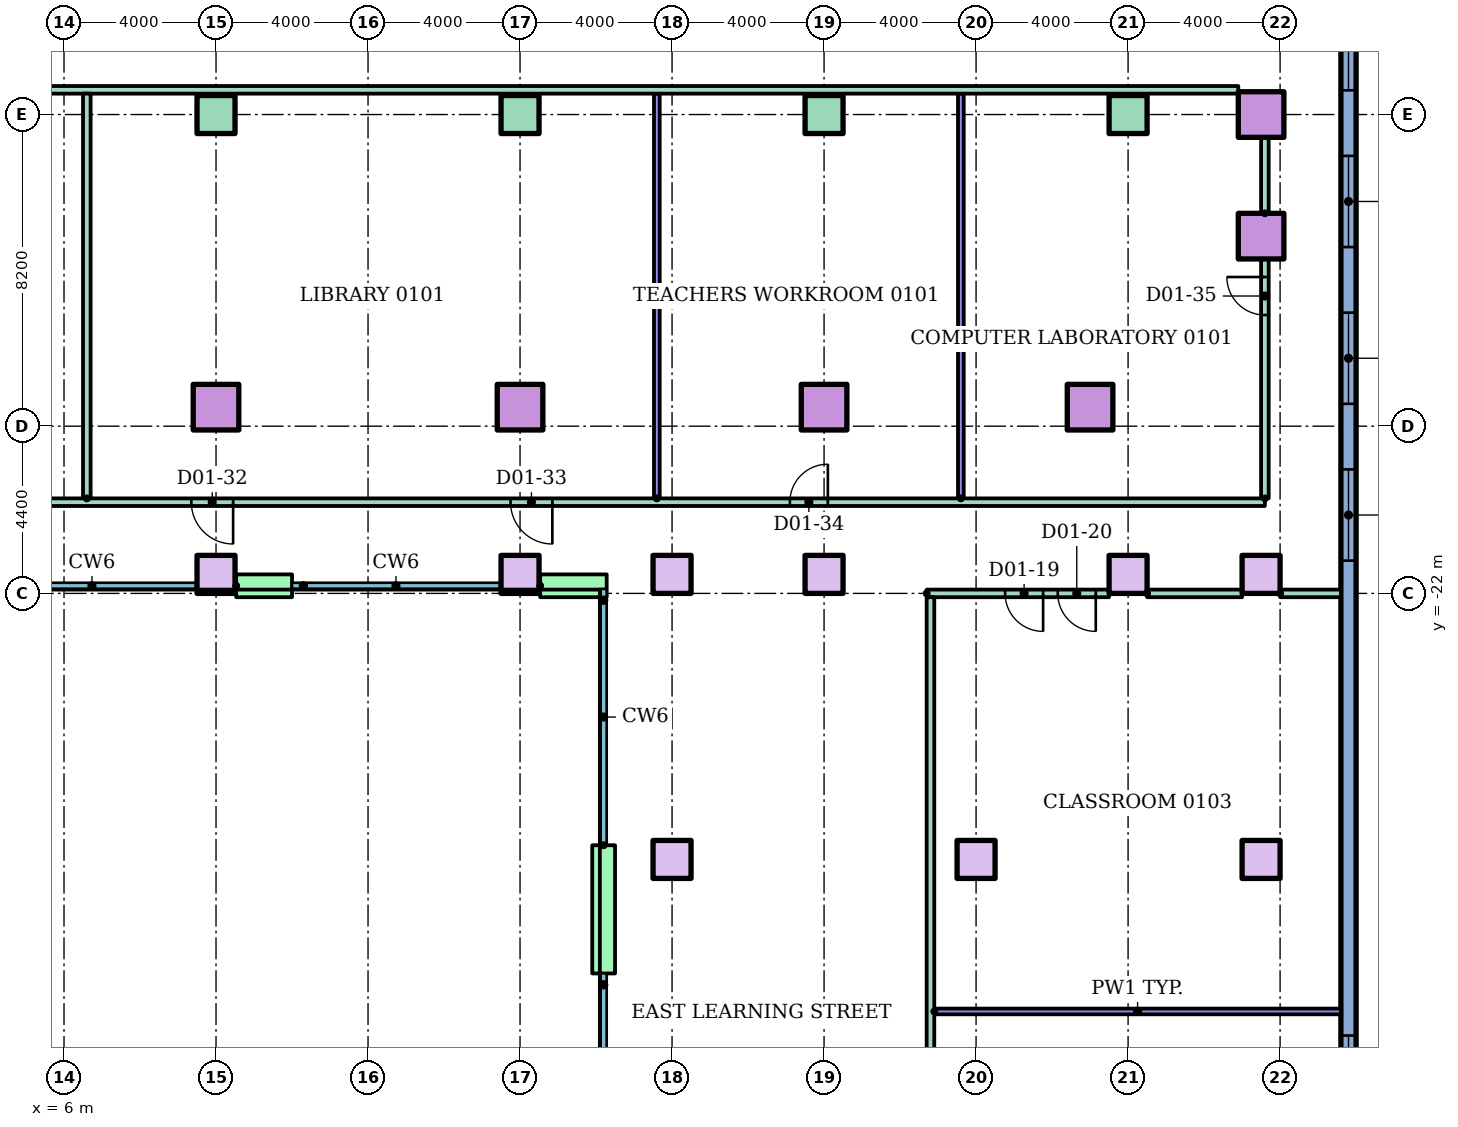
"""IFC4 building model, lengths in metres.
Left out: names, types, materials, properties, quantities, classifications, styles, units other than length and angle.
Written with IfcOpenShell. Run it as: python <this file> out.ifc"""

import sys

from ifc_helpers import new_model, si_unit, direction, frame, frame_2d, origin, origin_2d, place, context, subcontext, project, spatial, rectangle, hollow_rectangle, extrude, element, fill, save


model = new_model("IFC4")
c1 = context("Model", 3, precision=1e-05, world=origin(), true_north=direction((0.0, 1.0)))
c2 = subcontext(c1, "Body", "Model", "MODEL_VIEW")
j1 = project(units=[si_unit("LENGTHUNIT", "METRE"), si_unit("PLANEANGLEUNIT", "RADIAN")], contexts=[c1])
p1 = place(None, origin())
s1 = spatial("IfcSite", under=j1, at=p1, CompositionType="ELEMENT")
p2 = place(p1, origin())
s2 = spatial("IfcBuilding", under=s1, at=p2, CompositionType="ELEMENT")
p3 = place(p2, frame((0.0, 0.0, 6.0)))
s3 = spatial("IfcBuildingStorey", under=s2, at=p3, CompositionType="ELEMENT", Elevation=6.0)
for number, where in (
    (1, (10.0, -17.1, 0.0)),
    (2, (18.0, -17.1, 0.0)),
    (3, (26.0, -17.1, 0.0)),
    (4, (33.0, -17.1, 0.0)),
    (5, (37.5, -12.6, 0.0)),
):
    element("IfcColumn", number, at=place(p3, frame(where)), inside=s3, PredefinedType="COLUMN", context=c2, shape_type="SweptSolid", body=[
        extrude(hollow_rectangle(XDim=1.2, YDim=1.2, WallThickness=0.06, at=origin_2d()), origin(), (0.0, 0.0, 1.0), 4.0),
    ])
for number, where in (
    (6, (10.0, -9.4, 0.0)),
    (7, (18.0, -9.4, 0.0)),
    (8, (26.0, -9.4, 0.0)),
    (9, (34.0, -9.4, 0.0)),
):
    element("IfcColumn", number, at=place(p3, frame(where)), inside=s3, PredefinedType="COLUMN", context=c2, shape_type="SweptSolid", body=[
        extrude(rectangle(XDim=1.0, YDim=1.0, at=origin_2d()), origin(), (0.0, 0.0, 1.0), 4.0),
    ])
p4 = place(p3, frame((37.5, -9.4, 0.0)))
e10 = element("IfcColumn", 10, at=p4, inside=s3, PredefinedType="COLUMN", context=c2, shape_type="SweptSolid", body=[
    extrude(hollow_rectangle(XDim=1.2, YDim=1.2, WallThickness=0.06, at=origin_2d()), origin(), (0.0, 0.0, 1.0), 4.0),
])
for number, where in (
    (11, (22.0, -29.0, 0.0)),
    (12, (30.0, -29.0, 0.0)),
    (13, (37.5, -29.0, 0.0)),
    (14, (10.0, -21.5, 0.0)),
    (15, (18.0, -21.5, 0.0)),
    (16, (22.0, -21.5, 0.0)),
    (17, (26.0, -21.5, 0.0)),
    (18, (34.0, -21.5, 0.0)),
    (19, (37.5, -21.5, 0.0)),
):
    element("IfcColumn", number, at=place(p3, frame(where)), inside=s3, PredefinedType="COLUMN", context=c2, shape_type="SweptSolid", body=[
        extrude(rectangle(XDim=1.0, YDim=1.0, at=origin_2d()), origin(), (0.0, 0.0, 1.0), 4.0),
    ])
p5 = place(p3, frame((39.8, -50.0, 0.0), z_axis=(0.0, 0.0, 1.0), x_axis=(0.0, 1.0, 0.0)))
e20 = element("IfcWall", 20, at=p5, inside=s3, PredefinedType="STANDARD", context=c2, shape_type="SweptSolid", body=[
    extrude(rectangle(XDim=70.0, YDim=0.4, at=frame_2d((35.0, 0.0))), origin(), (0.0, 0.0, 1.0), 3.7),
])
p6 = place(p5, frame((0.75, 0.0, 0.9)))
e21 = element("IfcOpeningElement", 21, at=p6, cuts=e20, PredefinedType="OPENING", context=c2, shape_type="SweptSolid", body=[
    extrude(rectangle(XDim=2.4, YDim=2.1, at=frame_2d((1.2, 1.05))), frame((0.0, 0.21, 0.0), z_axis=(0.0, -1.0, 0.0), x_axis=(1.0, 0.0, 0.0)), (0.0, 0.0, 1.0), 0.42),
])
p7 = place(p5, frame((6.633, 0.0, 0.9)))
e22 = element("IfcOpeningElement", 22, at=p7, cuts=e20, PredefinedType="OPENING", context=c2, shape_type="SweptSolid", body=[
    extrude(rectangle(XDim=2.4, YDim=2.1, at=frame_2d((1.2, 1.05))), frame((0.0, 0.21, 0.0), z_axis=(0.0, -1.0, 0.0), x_axis=(1.0, 0.0, 0.0)), (0.0, 0.0, 1.0), 0.42),
])
p8 = place(p5, frame((10.3, 0.0, 0.9)))
e23 = element("IfcOpeningElement", 23, at=p8, cuts=e20, PredefinedType="OPENING", context=c2, shape_type="SweptSolid", body=[
    extrude(rectangle(XDim=2.4, YDim=2.1, at=frame_2d((1.2, 1.05))), frame((0.0, 0.21, 0.0), z_axis=(0.0, -1.0, 0.0), x_axis=(1.0, 0.0, 0.0)), (0.0, 0.0, 1.0), 0.42),
])
p9 = place(p5, frame((13.967, 0.0, 0.9)))
e24 = element("IfcOpeningElement", 24, at=p9, cuts=e20, PredefinedType="OPENING", context=c2, shape_type="SweptSolid", body=[
    extrude(rectangle(XDim=2.4, YDim=2.1, at=frame_2d((1.2, 1.05))), frame((0.0, 0.21, 0.0), z_axis=(0.0, -1.0, 0.0), x_axis=(1.0, 0.0, 0.0)), (0.0, 0.0, 1.0), 0.42),
])
p10 = place(p5, frame((28.863, 0.0, 0.9)))
e25 = element("IfcOpeningElement", 25, at=p10, cuts=e20, PredefinedType="OPENING", context=c2, shape_type="SweptSolid", body=[
    extrude(rectangle(XDim=2.4, YDim=2.1, at=frame_2d((1.2, 1.05))), frame((0.0, 0.21, 0.0), z_axis=(0.0, -1.0, 0.0), x_axis=(1.0, 0.0, 0.0)), (0.0, 0.0, 1.0), 0.42),
])
p11 = place(p5, frame((32.988, 0.0, 0.9)))
e26 = element("IfcOpeningElement", 26, at=p11, cuts=e20, PredefinedType="OPENING", context=c2, shape_type="SweptSolid", body=[
    extrude(rectangle(XDim=2.4, YDim=2.1, at=frame_2d((1.2, 1.05))), frame((0.0, 0.21, 0.0), z_axis=(0.0, -1.0, 0.0), x_axis=(1.0, 0.0, 0.0)), (0.0, 0.0, 1.0), 0.42),
])
p12 = place(p5, frame((37.113, 0.0, 0.9)))
e27 = element("IfcOpeningElement", 27, at=p12, cuts=e20, PredefinedType="OPENING", context=c2, shape_type="SweptSolid", body=[
    extrude(rectangle(XDim=2.4, YDim=2.1, at=frame_2d((1.2, 1.05))), frame((0.0, 0.21, 0.0), z_axis=(0.0, -1.0, 0.0), x_axis=(1.0, 0.0, 0.0)), (0.0, 0.0, 1.0), 0.42),
])
p13 = place(p5, frame((41.238, 0.0, 0.9)))
e28 = element("IfcOpeningElement", 28, at=p13, cuts=e20, PredefinedType="OPENING", context=c2, shape_type="SweptSolid", body=[
    extrude(rectangle(XDim=2.4, YDim=2.1, at=frame_2d((1.2, 1.05))), frame((0.0, 0.21, 0.0), z_axis=(0.0, -1.0, 0.0), x_axis=(1.0, 0.0, 0.0)), (0.0, 0.0, 1.0), 0.42),
])
p14 = place(p5, frame((45.363, 0.0, 0.9)))
e29 = element("IfcOpeningElement", 29, at=p14, cuts=e20, PredefinedType="OPENING", context=c2, shape_type="SweptSolid", body=[
    extrude(rectangle(XDim=2.4, YDim=2.1, at=frame_2d((1.2, 1.05))), frame((0.0, 0.21, 0.0), z_axis=(0.0, -1.0, 0.0), x_axis=(1.0, 0.0, 0.0)), (0.0, 0.0, 1.0), 0.42),
])
p15 = place(p5, frame((49.488, 0.0, 0.9)))
e30 = element("IfcOpeningElement", 30, at=p15, cuts=e20, PredefinedType="OPENING", context=c2, shape_type="SweptSolid", body=[
    extrude(rectangle(XDim=2.4, YDim=2.1, at=frame_2d((1.2, 1.05))), frame((0.0, 0.21, 0.0), z_axis=(0.0, -1.0, 0.0), x_axis=(1.0, 0.0, 0.0)), (0.0, 0.0, 1.0), 0.42),
])
p16 = place(p5, frame((53.613, 0.0, 0.9)))
e31 = element("IfcOpeningElement", 31, at=p16, cuts=e20, PredefinedType="OPENING", context=c2, shape_type="SweptSolid", body=[
    extrude(rectangle(XDim=2.4, YDim=2.1, at=frame_2d((1.2, 1.05))), frame((0.0, 0.21, 0.0), z_axis=(0.0, -1.0, 0.0), x_axis=(1.0, 0.0, 0.0)), (0.0, 0.0, 1.0), 0.42),
])
p17 = place(p5, frame((57.738, 0.0, 0.9)))
e32 = element("IfcOpeningElement", 32, at=p17, cuts=e20, PredefinedType="OPENING", context=c2, shape_type="SweptSolid", body=[
    extrude(rectangle(XDim=2.4, YDim=2.1, at=frame_2d((1.2, 1.05))), frame((0.0, 0.21, 0.0), z_axis=(0.0, -1.0, 0.0), x_axis=(1.0, 0.0, 0.0)), (0.0, 0.0, 1.0), 0.42),
])
p18 = place(p5, frame((62.05, 0.0, 0.9)))
e33 = element("IfcOpeningElement", 33, at=p18, cuts=e20, PredefinedType="OPENING", context=c2, shape_type="SweptSolid", body=[
    extrude(rectangle(XDim=2.4, YDim=2.1, at=frame_2d((1.2, 1.05))), frame((0.0, 0.21, 0.0), z_axis=(0.0, -1.0, 0.0), x_axis=(1.0, 0.0, 0.0)), (0.0, 0.0, 1.0), 0.42),
])
p19 = place(p5, frame((66.55, 0.0, 0.9)))
e34 = element("IfcOpeningElement", 34, at=p19, cuts=e20, PredefinedType="OPENING", context=c2, shape_type="SweptSolid", body=[
    extrude(rectangle(XDim=2.4, YDim=2.1, at=frame_2d((1.2, 1.05))), frame((0.0, 0.21, 0.0), z_axis=(0.0, -1.0, 0.0), x_axis=(1.0, 0.0, 0.0)), (0.0, 0.0, 1.0), 0.42),
])
p20 = place(p3, frame((10.53, -21.8, 0.0)))
e35 = element("IfcWall", 35, at=p20, inside=s3, PredefinedType="STANDARD", context=c2, shape_type="SweptSolid", body=[
    extrude(rectangle(XDim=1.47, YDim=0.6, at=frame_2d((0.735, 0.0))), origin(), (0.0, 0.0, 1.0), 3.7),
])
p21 = place(p3, frame((18.53, -21.8, 0.0)))
e36 = element("IfcWall", 36, at=p21, inside=s3, PredefinedType="STANDARD", context=c2, shape_type="SweptSolid", body=[
    extrude(rectangle(XDim=1.75, YDim=0.6, at=frame_2d((0.875, 0.0))), origin(), (0.0, 0.0, 1.0), 3.7),
])
p22 = place(p3, frame((20.2, -28.627, 0.0), z_axis=(0.0, 0.0, 1.0), x_axis=(0.0, -1.0, 0.0)))
e37 = element("IfcWall", 37, at=p22, inside=s3, PredefinedType="STANDARD", context=c2, shape_type="SweptSolid", body=[
    extrude(rectangle(XDim=3.373, YDim=0.6, at=frame_2d((1.687, 0.0))), origin(), (0.0, 0.0, 1.0), 3.7),
])
p23 = place(p3, frame((28.9, -33.0, 0.0)))
e38 = element("IfcWall", 38, at=p23, inside=s3, PredefinedType="PARTITIONING", context=c2, shape_type="SweptSolid", body=[
    extrude(rectangle(XDim=10.7, YDim=0.15, at=frame_2d((5.35, 0.0))), origin(), (0.0, 0.0, 1.0), 3.7),
])
p24 = place(p3, frame((28.7, -22.0, 0.0)))
e39 = element("IfcWall", 39, at=p24, inside=s3, PredefinedType="PARTITIONING", context=c2, shape_type="SweptSolid", body=[
    extrude(rectangle(XDim=4.8, YDim=0.2, at=frame_2d((2.4, 0.0))), origin(), (0.0, 0.0, 1.0), 3.7),
])
p25 = place(p24, frame((2.064, 0.0, 0.0)))
e40 = element("IfcOpeningElement", 40, at=p25, cuts=e39, PredefinedType="OPENING", context=c2, shape_type="SweptSolid", body=[
    extrude(rectangle(XDim=1.0, YDim=2.1, at=frame_2d((0.5, 1.05))), frame((0.0, 0.11, 0.0), z_axis=(0.0, -1.0, 0.0), x_axis=(1.0, 0.0, 0.0)), (0.0, 0.0, 1.0), 0.22),
])
p26 = place(p24, frame((3.45, 0.0, 0.0)))
e41 = element("IfcOpeningElement", 41, at=p26, cuts=e39, PredefinedType="OPENING", context=c2, shape_type="SweptSolid", body=[
    extrude(rectangle(XDim=1.0, YDim=2.1, at=frame_2d((0.5, 1.05))), frame((0.0, 0.11, 0.0), z_axis=(0.0, -1.0, 0.0), x_axis=(1.0, 0.0, 0.0)), (0.0, 0.0, 1.0), 0.22),
])
p27 = place(p3, frame((34.5, -22.0, 0.0)))
e42 = element("IfcWall", 42, at=p27, inside=s3, PredefinedType="PARTITIONING", context=c2, shape_type="SweptSolid", body=[
    extrude(rectangle(XDim=2.5, YDim=0.2, at=frame_2d((1.25, 0.0))), origin(), (0.0, 0.0, 1.0), 3.7),
])
p28 = place(p3, frame((38.0, -22.0, 0.0)))
e43 = element("IfcWall", 43, at=p28, inside=s3, PredefinedType="PARTITIONING", context=c2, shape_type="SweptSolid", body=[
    extrude(rectangle(XDim=1.6, YDim=0.2, at=frame_2d((0.8, 0.0))), origin(), (0.0, 0.0, 1.0), 3.7),
])
p29 = place(p3, frame((-37.6, -19.6, 0.0)))
e44 = element("IfcWall", 44, at=p29, inside=s3, PredefinedType="PARTITIONING", context=c2, shape_type="SweptSolid", body=[
    extrude(rectangle(XDim=75.2, YDim=0.2, at=frame_2d((37.6, 0.0))), origin(), (0.0, 0.0, 1.0), 3.7),
])
p30 = place(p29, frame((14.5, 0.0, 0.0)))
e45 = element("IfcOpeningElement", 45, at=p30, cuts=e44, PredefinedType="OPENING", context=c2, shape_type="SweptSolid", body=[
    extrude(rectangle(XDim=1.0, YDim=2.1, at=frame_2d((0.5, 1.05))), frame((0.0, 0.11, 0.0), z_axis=(0.0, -1.0, 0.0), x_axis=(1.0, 0.0, 0.0)), (0.0, 0.0, 1.0), 0.22),
])
p31 = place(p29, frame((22.184, 0.0, 0.0)))
e46 = element("IfcOpeningElement", 46, at=p31, cuts=e44, PredefinedType="OPENING", context=c2, shape_type="SweptSolid", body=[
    extrude(rectangle(XDim=1.0, YDim=2.1, at=frame_2d((0.5, 1.05))), frame((0.0, 0.11, 0.0), z_axis=(0.0, -1.0, 0.0), x_axis=(1.0, 0.0, 0.0)), (0.0, 0.0, 1.0), 0.22),
])
p32 = place(p29, frame((29.016, 0.0, 0.0)))
e47 = element("IfcOpeningElement", 47, at=p32, cuts=e44, PredefinedType="OPENING", context=c2, shape_type="SweptSolid", body=[
    extrude(rectangle(XDim=1.0, YDim=2.1, at=frame_2d((0.5, 1.05))), frame((0.0, 0.11, 0.0), z_axis=(0.0, -1.0, 0.0), x_axis=(1.0, 0.0, 0.0)), (0.0, 0.0, 1.0), 0.22),
])
p33 = place(p29, frame((34.34, 0.0, 0.0)))
e48 = element("IfcOpeningElement", 48, at=p33, cuts=e44, PredefinedType="OPENING", context=c2, shape_type="SweptSolid", body=[
    extrude(rectangle(XDim=1.0, YDim=2.1, at=frame_2d((0.5, 1.05))), frame((0.0, 0.11, 0.0), z_axis=(0.0, -1.0, 0.0), x_axis=(1.0, 0.0, 0.0)), (0.0, 0.0, 1.0), 0.22),
])
p34 = place(p29, frame((41.06, 0.0, 0.0)))
e49 = element("IfcOpeningElement", 49, at=p34, cuts=e44, PredefinedType="OPENING", context=c2, shape_type="SweptSolid", body=[
    extrude(rectangle(XDim=1.0, YDim=2.1, at=frame_2d((0.5, 1.05))), frame((0.0, 0.11, 0.0), z_axis=(0.0, -1.0, 0.0), x_axis=(1.0, 0.0, 0.0)), (0.0, 0.0, 1.0), 0.22),
])
p35 = place(p29, frame((46.95, 0.0, 0.0)))
e50 = element("IfcOpeningElement", 50, at=p35, cuts=e44, PredefinedType="OPENING", context=c2, shape_type="SweptSolid", body=[
    extrude(rectangle(XDim=1.1, YDim=2.1, at=frame_2d((0.55, 1.05))), frame((0.0, 0.11, 0.0), z_axis=(0.0, -1.0, 0.0), x_axis=(1.0, 0.0, 0.0)), (0.0, 0.0, 1.0), 0.22),
])
p36 = place(p29, frame((55.35, 0.0, 0.0)))
e51 = element("IfcOpeningElement", 51, at=p36, cuts=e44, PredefinedType="OPENING", context=c2, shape_type="SweptSolid", body=[
    extrude(rectangle(XDim=1.1, YDim=2.1, at=frame_2d((0.55, 1.05))), frame((0.0, 0.11, 0.0), z_axis=(0.0, -1.0, 0.0), x_axis=(1.0, 0.0, 0.0)), (0.0, 0.0, 1.0), 0.22),
])
p37 = place(p29, frame((62.7, 0.0, 0.0)))
e52 = element("IfcOpeningElement", 52, at=p37, cuts=e44, PredefinedType="OPENING", context=c2, shape_type="SweptSolid", body=[
    extrude(rectangle(XDim=1.0, YDim=2.1, at=frame_2d((0.5, 1.05))), frame((0.0, 0.11, 0.0), z_axis=(0.0, -1.0, 0.0), x_axis=(1.0, 0.0, 0.0)), (0.0, 0.0, 1.0), 0.22),
])
p38 = place(p3, frame((-36.9, -8.75, 0.0)))
e53 = element("IfcWall", 53, at=p38, inside=s3, PredefinedType="PARTITIONING", context=c2, shape_type="SweptSolid", body=[
    extrude(rectangle(XDim=73.8, YDim=0.2, at=frame_2d((36.9, 0.0))), origin(), (0.0, 0.0, 1.0), 3.7),
])
p39 = place(p3, frame((6.6, -19.5, 0.0), z_axis=(0.0, 0.0, 1.0), x_axis=(0.0, 1.0, 0.0)))
e54 = element("IfcWall", 54, at=p39, inside=s3, PredefinedType="PARTITIONING", context=c2, shape_type="SweptSolid", body=[
    extrude(rectangle(XDim=10.65, YDim=0.2, at=frame_2d((5.325, 0.0))), origin(), (0.0, 0.0, 1.0), 3.7),
])
p40 = place(p3, frame((21.6, -19.5, 0.0), z_axis=(0.0, 0.0, 1.0), x_axis=(0.0, 1.0, 0.0)))
e55 = element("IfcWall", 55, at=p40, inside=s3, PredefinedType="PARTITIONING", context=c2, shape_type="SweptSolid", body=[
    extrude(rectangle(XDim=10.65, YDim=0.15, at=frame_2d((5.325, 0.0))), origin(), (0.0, 0.0, 1.0), 3.7),
])
p41 = place(p3, frame((28.8, -44.0, 0.0), z_axis=(0.0, 0.0, 1.0), x_axis=(0.0, 1.0, 0.0)))
e56 = element("IfcWall", 56, at=p41, inside=s3, PredefinedType="PARTITIONING", context=c2, shape_type="SweptSolid", body=[
    extrude(rectangle(XDim=21.9, YDim=0.2, at=frame_2d((10.95, 0.0))), origin(), (0.0, 0.0, 1.0), 3.7),
])
p42 = place(p3, frame((29.6, -19.5, 0.0), z_axis=(0.0, 0.0, 1.0), x_axis=(0.0, 1.0, 0.0)))
e57 = element("IfcWall", 57, at=p42, inside=s3, PredefinedType="PARTITIONING", context=c2, shape_type="SweptSolid", body=[
    extrude(rectangle(XDim=10.65, YDim=0.15, at=frame_2d((5.325, 0.0))), origin(), (0.0, 0.0, 1.0), 3.7),
])
p43 = place(p3, frame((37.6, -19.5, 0.0), z_axis=(0.0, 0.0, 1.0), x_axis=(0.0, 1.0, 0.0)))
e58 = element("IfcWall", 58, at=p43, inside=s3, PredefinedType="PARTITIONING", context=c2, shape_type="SweptSolid", body=[
    extrude(rectangle(XDim=6.3, YDim=0.2, at=frame_2d((3.15, 0.0))), origin(), (0.0, 0.0, 1.0), 3.7),
])
p44 = place(p43, frame((4.825, 0.0, 0.0)))
e59 = element("IfcOpeningElement", 59, at=p44, cuts=e58, PredefinedType="OPENING", context=c2, shape_type="SweptSolid", body=[
    extrude(rectangle(XDim=1.0, YDim=2.1, at=frame_2d((0.5, 1.05))), frame((0.0, 0.11, 0.0), z_axis=(0.0, -1.0, 0.0), x_axis=(1.0, 0.0, 0.0)), (0.0, 0.0, 1.0), 0.22),
])
p45 = place(p3, frame((37.6, -12.0, 0.0), z_axis=(0.0, 0.0, 1.0), x_axis=(0.0, 1.0, 0.0)))
e60 = element("IfcWall", 60, at=p45, inside=s3, PredefinedType="PARTITIONING", context=c2, shape_type="SweptSolid", body=[
    extrude(rectangle(XDim=2.0, YDim=0.2, at=frame_2d((1.0, 0.0))), origin(), (0.0, 0.0, 1.0), 3.7),
])
p46 = place(p9, origin())
e61 = element("IfcWindow", 61, at=p46, inside=s3, PartitioningType="SINGLE_PANEL", PredefinedType="WINDOW", context=c2, shape_type="SweptSolid", body=[
    extrude(rectangle(XDim=2.4, YDim=2.1, at=frame_2d((1.2, 1.05))), frame((0.0, 0.03, 0.0), z_axis=(0.0, -1.0, 0.0), x_axis=(1.0, 0.0, 0.0)), (0.0, 0.0, 1.0), 0.06),
])
fill(e24, e61)
p47 = place(p10, origin())
e62 = element("IfcWindow", 62, at=p47, inside=s3, PartitioningType="SINGLE_PANEL", PredefinedType="WINDOW", context=c2, shape_type="SweptSolid", body=[
    extrude(rectangle(XDim=2.4, YDim=2.1, at=frame_2d((1.2, 1.05))), frame((0.0, 0.03, 0.0), z_axis=(0.0, -1.0, 0.0), x_axis=(1.0, 0.0, 0.0)), (0.0, 0.0, 1.0), 0.06),
])
fill(e25, e62)
p48 = place(p11, origin())
e63 = element("IfcWindow", 63, at=p48, inside=s3, PartitioningType="SINGLE_PANEL", PredefinedType="WINDOW", context=c2, shape_type="SweptSolid", body=[
    extrude(rectangle(XDim=2.4, YDim=2.1, at=frame_2d((1.2, 1.05))), frame((0.0, 0.03, 0.0), z_axis=(0.0, -1.0, 0.0), x_axis=(1.0, 0.0, 0.0)), (0.0, 0.0, 1.0), 0.06),
])
fill(e26, e63)
p49 = place(p12, origin())
e64 = element("IfcWindow", 64, at=p49, inside=s3, PartitioningType="SINGLE_PANEL", PredefinedType="WINDOW", context=c2, shape_type="SweptSolid", body=[
    extrude(rectangle(XDim=2.4, YDim=2.1, at=frame_2d((1.2, 1.05))), frame((0.0, 0.03, 0.0), z_axis=(0.0, -1.0, 0.0), x_axis=(1.0, 0.0, 0.0)), (0.0, 0.0, 1.0), 0.06),
])
fill(e27, e64)
p50 = place(p13, origin())
e65 = element("IfcWindow", 65, at=p50, inside=s3, PartitioningType="SINGLE_PANEL", PredefinedType="WINDOW", context=c2, shape_type="SweptSolid", body=[
    extrude(rectangle(XDim=2.4, YDim=2.1, at=frame_2d((1.2, 1.05))), frame((0.0, 0.03, 0.0), z_axis=(0.0, -1.0, 0.0), x_axis=(1.0, 0.0, 0.0)), (0.0, 0.0, 1.0), 0.06),
])
fill(e28, e65)
p51 = place(p25, frame((1.0, 0.0, 0.0), z_axis=(0.0, 0.0, 1.0), x_axis=(-1.0, 0.0, 0.0)))
e66 = element("IfcDoor", 66, at=p51, inside=s3, OperationType="SINGLE_SWING_RIGHT", PredefinedType="DOOR", context=c2, shape_type="SweptSolid", body=[
    extrude(rectangle(XDim=1.0, YDim=2.1, at=frame_2d((0.5, 1.05))), frame((0.0, 0.025, 0.0), z_axis=(0.0, -1.0, 0.0), x_axis=(1.0, 0.0, 0.0)), (0.0, 0.0, 1.0), 0.05),
])
fill(e40, e66)
p52 = place(p26, frame((1.0, 0.0, 0.0), z_axis=(0.0, 0.0, 1.0), x_axis=(-1.0, 0.0, 0.0)))
e67 = element("IfcDoor", 67, at=p52, inside=s3, OperationType="SINGLE_SWING_RIGHT", PredefinedType="DOOR", context=c2, shape_type="SweptSolid", body=[
    extrude(rectangle(XDim=1.0, YDim=2.1, at=frame_2d((0.5, 1.05))), frame((0.0, 0.025, 0.0), z_axis=(0.0, -1.0, 0.0), x_axis=(1.0, 0.0, 0.0)), (0.0, 0.0, 1.0), 0.05),
])
fill(e41, e67)
p53 = place(p35, frame((1.1, 0.0, 0.0), z_axis=(0.0, 0.0, 1.0), x_axis=(-1.0, 0.0, 0.0)))
e68 = element("IfcDoor", 68, at=p53, inside=s3, OperationType="SINGLE_SWING_RIGHT", PredefinedType="DOOR", context=c2, shape_type="SweptSolid", body=[
    extrude(rectangle(XDim=1.1, YDim=2.1, at=frame_2d((0.55, 1.05))), frame((0.0, 0.025, 0.0), z_axis=(0.0, -1.0, 0.0), x_axis=(1.0, 0.0, 0.0)), (0.0, 0.0, 1.0), 0.05),
])
fill(e50, e68)
p54 = place(p36, frame((1.1, 0.0, 0.0), z_axis=(0.0, 0.0, 1.0), x_axis=(-1.0, 0.0, 0.0)))
e69 = element("IfcDoor", 69, at=p54, inside=s3, OperationType="SINGLE_SWING_RIGHT", PredefinedType="DOOR", context=c2, shape_type="SweptSolid", body=[
    extrude(rectangle(XDim=1.1, YDim=2.1, at=frame_2d((0.55, 1.05))), frame((0.0, 0.025, 0.0), z_axis=(0.0, -1.0, 0.0), x_axis=(1.0, 0.0, 0.0)), (0.0, 0.0, 1.0), 0.05),
])
fill(e51, e69)
p55 = place(p37, origin())
e70 = element("IfcDoor", 70, at=p55, inside=s3, OperationType="SINGLE_SWING_RIGHT", PredefinedType="DOOR", context=c2, shape_type="SweptSolid", body=[
    extrude(rectangle(XDim=1.0, YDim=2.1, at=frame_2d((0.5, 1.05))), frame((0.0, 0.025, 0.0), z_axis=(0.0, -1.0, 0.0), x_axis=(1.0, 0.0, 0.0)), (0.0, 0.0, 1.0), 0.05),
])
fill(e52, e70)
p56 = place(p44, origin())
e71 = element("IfcDoor", 71, at=p56, inside=s3, OperationType="SINGLE_SWING_RIGHT", PredefinedType="DOOR", context=c2, shape_type="SweptSolid", body=[
    extrude(rectangle(XDim=1.0, YDim=2.1, at=frame_2d((0.5, 1.05))), frame((0.0, 0.025, 0.0), z_axis=(0.0, -1.0, 0.0), x_axis=(1.0, 0.0, 0.0)), (0.0, 0.0, 1.0), 0.05),
])
fill(e59, e71)
save(model, sys.argv[1])
